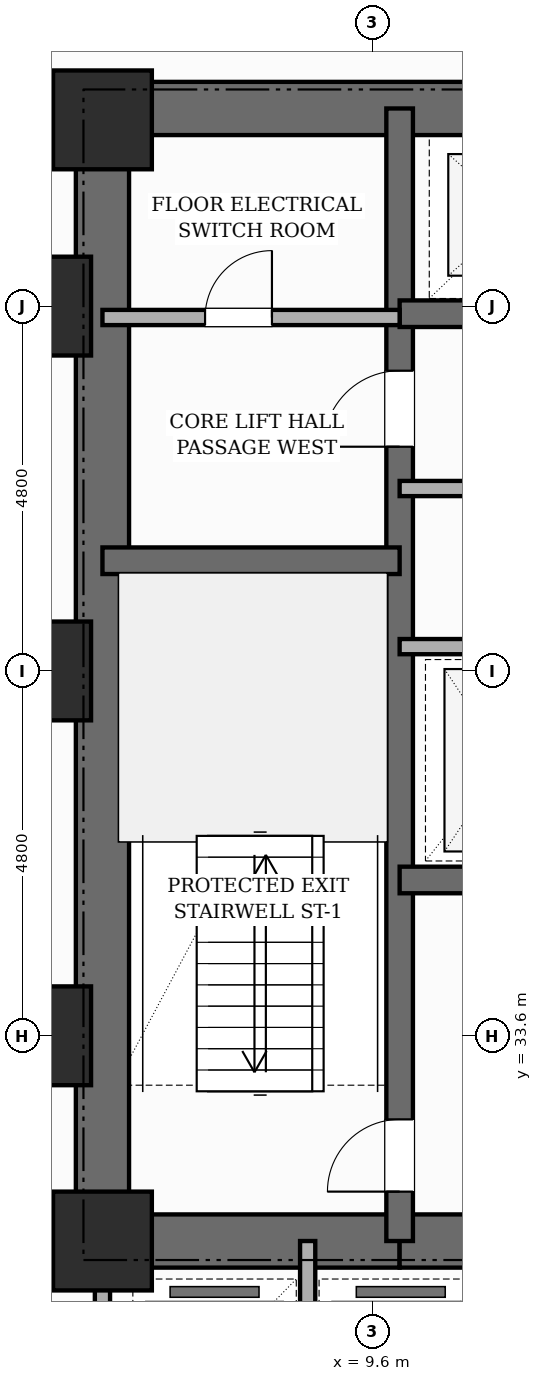
"""IFC4 building model, lengths in metres.
Left out: names, types, materials, properties, quantities, classifications, styles, units other than length and angle.
Written with IfcOpenShell. Run it as: python <this file> out.ifc"""

import sys

from ifc_helpers import new_model, si_unit, direction, frame, frame_2d, origin, origin_2d, place, context, subcontext, project, spatial, rectangle, extrude, element, fill, save


model = new_model("IFC4")
c1 = context("Model", 3, precision=1e-05, world=origin(), true_north=direction((0.0, 1.0)))
c2 = subcontext(c1, "Body", "Model", "MODEL_VIEW")
j1 = project(units=[si_unit("LENGTHUNIT", "METRE"), si_unit("PLANEANGLEUNIT", "RADIAN")], contexts=[c1])
p1 = place(None, origin())
s1 = spatial("IfcSite", under=j1, at=p1, CompositionType="ELEMENT")
p2 = place(p1, origin())
s2 = spatial("IfcBuilding", under=s1, at=p2, CompositionType="ELEMENT")
p3 = place(p2, frame((0.0, 0.0, -8.8)))
s3 = spatial("IfcBuildingStorey", under=s2, at=p3, CompositionType="ELEMENT", Elevation=-8.8)
p4 = place(p3, frame((6.05, 30.55, 0.0), z_axis=(0.0, 0.0, 1.0), x_axis=(0.0, 1.0, 0.0)))
e1 = element("IfcWall", 1, at=p4, inside=s3, PredefinedType="SHEAR", context=c2, shape_type="SweptSolid", body=[
    extrude(rectangle(XDim=15.6, YDim=0.7, at=frame_2d((7.8, 0.0))), origin(), (0.0, 0.0, 1.0), 4.4),
])
p5 = place(p3, frame((6.05, 45.8, 0.0), z_axis=(0.0, 0.0, 1.0), x_axis=(1.0, 0.0, 0.0)))
e2 = element("IfcWall", 2, at=p5, inside=s3, PredefinedType="SHEAR", context=c2, shape_type="SweptSolid", body=[
    extrude(rectangle(XDim=16.7, YDim=0.7, at=frame_2d((8.35, 0.0))), origin(), (0.0, 0.0, 1.0), 4.4),
])
p6 = place(p3, frame((6.05, 30.9, 0.0), z_axis=(0.0, 0.0, 1.0), x_axis=(1.0, 0.0, 0.0)))
e3 = element("IfcWall", 3, at=p6, inside=s3, PredefinedType="SHEAR", context=c2, shape_type="SweptSolid", body=[
    extrude(rectangle(XDim=3.91, YDim=0.7, at=frame_2d((1.955, 0.0))), origin(), (0.0, 0.0, 1.0), 4.4),
])
p7 = place(p3, frame((9.96, 30.9, 0.0), z_axis=(0.0, 0.0, 1.0), x_axis=(1.0, 0.0, 0.0)))
e4 = element("IfcWall", 4, at=p7, inside=s3, PredefinedType="SHEAR", context=c2, shape_type="SweptSolid", body=[
    extrude(rectangle(XDim=8.88, YDim=0.7, at=frame_2d((4.44, 0.0))), origin(), (0.0, 0.0, 1.0), 4.4),
])
p8 = place(p7, frame((4.09, 0.0, 0.0)))
e5 = element("IfcOpeningElement", 5, at=p8, cuts=e4, PredefinedType="OPENING", context=c2, shape_type="SweptSolid", body=[
    extrude(rectangle(XDim=1.0, YDim=2.15, at=frame_2d((0.5, 1.075))), frame((0.0, 0.36, 0.0), z_axis=(0.0, -1.0, 0.0), x_axis=(1.0, 0.0, 0.0)), (0.0, 0.0, 1.0), 0.72),
])
p9 = place(p3, frame((9.96, 30.9, 0.0), z_axis=(0.0, 0.0, 1.0), x_axis=(0.0, 1.0, 0.0)))
e6 = element("IfcWall", 6, at=p9, inside=s3, PredefinedType="SHEAR", context=c2, shape_type="SweptSolid", body=[
    extrude(rectangle(XDim=14.9, YDim=0.35, at=frame_2d((7.45, 0.0))), origin(), (0.0, 0.0, 1.0), 4.4),
])
p10 = place(p9, frame((0.65, 0.0, 0.0)))
e7 = element("IfcOpeningElement", 7, at=p10, cuts=e6, PredefinedType="OPENING", context=c2, shape_type="SweptSolid", body=[
    extrude(rectangle(XDim=0.95, YDim=2.1, at=frame_2d((0.475, 1.05))), frame((0.0, 0.185, 0.0), z_axis=(0.0, -1.0, 0.0), x_axis=(1.0, 0.0, 0.0)), (0.0, 0.0, 1.0), 0.37),
])
p11 = place(p9, frame((10.45, 0.0, 0.0)))
e8 = element("IfcOpeningElement", 8, at=p11, cuts=e6, PredefinedType="OPENING", context=c2, shape_type="SweptSolid", body=[
    extrude(rectangle(XDim=1.0, YDim=2.15, at=frame_2d((0.5, 1.075))), frame((0.0, 0.185, 0.0), z_axis=(0.0, -1.0, 0.0), x_axis=(1.0, 0.0, 0.0)), (0.0, 0.0, 1.0), 0.37),
])
p12 = place(p3, frame((6.05, 39.85, 0.0), z_axis=(0.0, 0.0, 1.0), x_axis=(1.0, 0.0, 0.0)))
e9 = element("IfcWall", 9, at=p12, inside=s3, PredefinedType="SHEAR", context=c2, shape_type="SweptSolid", body=[
    extrude(rectangle(XDim=3.91, YDim=0.35, at=frame_2d((1.955, 0.0))), origin(), (0.0, 0.0, 1.0), 4.4),
])
p13 = place(p3, frame((9.96, 35.65, 0.0), z_axis=(0.0, 0.0, 1.0), x_axis=(1.0, 0.0, 0.0)))
e10 = element("IfcWall", 10, at=p13, inside=s3, PredefinedType="SHEAR", context=c2, shape_type="SweptSolid", body=[
    extrude(rectangle(XDim=8.88, YDim=0.35, at=frame_2d((4.44, 0.0))), origin(), (0.0, 0.0, 1.0), 4.4),
])
p14 = place(p13, frame((0.84, 0.0, 0.0)))
e11 = element("IfcOpeningElement", 11, at=p14, cuts=e10, PredefinedType="OPENING", context=c2, shape_type="SweptSolid", body=[
    extrude(rectangle(XDim=1.1, YDim=2.15, at=frame_2d((0.55, 1.075))), frame((0.0, 0.185, 0.0), z_axis=(0.0, -1.0, 0.0), x_axis=(1.0, 0.0, 0.0)), (0.0, 0.0, 1.0), 0.37),
])
p15 = place(p13, frame((5.24, 0.0, 0.0)))
e12 = element("IfcOpeningElement", 12, at=p15, cuts=e10, PredefinedType="OPENING", context=c2, shape_type="SweptSolid", body=[
    extrude(rectangle(XDim=1.1, YDim=2.15, at=frame_2d((0.55, 1.075))), frame((0.0, 0.185, 0.0), z_axis=(0.0, -1.0, 0.0), x_axis=(1.0, 0.0, 0.0)), (0.0, 0.0, 1.0), 0.37),
])
p16 = place(p13, frame((7.5, 0.0, 0.0)))
e13 = element("IfcOpeningElement", 13, at=p16, cuts=e10, PredefinedType="OPENING", context=c2, shape_type="SweptSolid", body=[
    extrude(rectangle(XDim=0.88, YDim=2.1, at=frame_2d((0.44, 1.05))), frame((0.0, 0.185, 0.0), z_axis=(0.0, -1.0, 0.0), x_axis=(1.0, 0.0, 0.0)), (0.0, 0.0, 1.0), 0.37),
])
p17 = place(p3, frame((9.96, 43.1, 0.0), z_axis=(0.0, 0.0, 1.0), x_axis=(1.0, 0.0, 0.0)))
e14 = element("IfcWall", 14, at=p17, inside=s3, PredefinedType="SHEAR", context=c2, shape_type="SweptSolid", body=[
    extrude(rectangle(XDim=8.88, YDim=0.35, at=frame_2d((4.44, 0.0))), origin(), (0.0, 0.0, 1.0), 4.4),
])
p18 = place(p17, frame((0.99, 0.0, 0.0)))
e15 = element("IfcOpeningElement", 15, at=p18, cuts=e14, PredefinedType="OPENING", context=c2, shape_type="SweptSolid", body=[
    extrude(rectangle(XDim=1.1, YDim=2.15, at=frame_2d((0.55, 1.075))), frame((0.0, 0.185, 0.0), z_axis=(0.0, -1.0, 0.0), x_axis=(1.0, 0.0, 0.0)), (0.0, 0.0, 1.0), 0.37),
])
p19 = place(p17, frame((3.89, 0.0, 0.0)))
e16 = element("IfcOpeningElement", 16, at=p19, cuts=e14, PredefinedType="OPENING", context=c2, shape_type="SweptSolid", body=[
    extrude(rectangle(XDim=1.1, YDim=2.15, at=frame_2d((0.55, 1.075))), frame((0.0, 0.185, 0.0), z_axis=(0.0, -1.0, 0.0), x_axis=(1.0, 0.0, 0.0)), (0.0, 0.0, 1.0), 0.37),
])
p20 = place(p17, frame((6.79, 0.0, 0.0)))
e17 = element("IfcOpeningElement", 17, at=p20, cuts=e14, PredefinedType="OPENING", context=c2, shape_type="SweptSolid", body=[
    extrude(rectangle(XDim=1.1, YDim=2.15, at=frame_2d((0.55, 1.075))), frame((0.0, 0.185, 0.0), z_axis=(0.0, -1.0, 0.0), x_axis=(1.0, 0.0, 0.0)), (0.0, 0.0, 1.0), 0.37),
])
for number, where, z_axis, x_axis in (
    (18, (5.25, 33.6, 0.0), (0.0, 0.0, 1.0), (1.0, 0.0, 0.0)),
    (19, (5.25, 38.4, 0.0), (0.0, 0.0, 1.0), (1.0, 0.0, 0.0)),
    (20, (5.25, 43.2, 0.0), (0.0, 0.0, 1.0), (1.0, 0.0, 0.0)),
    (21, (6.05, 30.9, 0.0), (0.0, 0.0, 1.0), (1.0, 0.0, 0.0)),
    (22, (6.05, 45.65, 0.0), (0.0, 0.0, 1.0), (1.0, 0.0, 0.0)),
):
    element("IfcColumn", number, at=place(p3, frame(where, z_axis=z_axis, x_axis=x_axis)), inside=s3, PredefinedType="COLUMN", context=c2, shape_type="SweptSolid", body=[
        extrude(rectangle(XDim=1.3, YDim=1.3, at=origin_2d()), origin(), (0.0, 0.0, 1.0), 4.4),
    ])
p21 = place(p3, frame((9.96, 38.72, 0.0), z_axis=(0.0, 0.0, 1.0), x_axis=(1.0, 0.0, 0.0)))
e23 = element("IfcWall", 23, at=p21, inside=s3, PredefinedType="POLYGONAL", context=c2, shape_type="SweptSolid", body=[
    extrude(rectangle(XDim=7.06, YDim=0.2, at=frame_2d((3.53, 0.0))), origin(), (0.0, 0.0, 1.0), 4.08),
])
p22 = place(p3, frame((9.96, 40.8, 0.0), z_axis=(0.0, 0.0, 1.0), x_axis=(1.0, 0.0, 0.0)))
e24 = element("IfcWall", 24, at=p22, inside=s3, PredefinedType="POLYGONAL", context=c2, shape_type="SweptSolid", body=[
    extrude(rectangle(XDim=8.88, YDim=0.2, at=frame_2d((4.44, 0.0))), origin(), (0.0, 0.0, 1.0), 4.08),
])
p23 = place(p22, frame((7.5, 0.0, 0.0)))
e25 = element("IfcOpeningElement", 25, at=p23, cuts=e24, PredefinedType="OPENING", context=c2, shape_type="SweptSolid", body=[
    extrude(rectangle(XDim=0.88, YDim=2.1, at=frame_2d((0.44, 1.05))), frame((0.0, 0.11, 0.0), z_axis=(0.0, -1.0, 0.0), x_axis=(1.0, 0.0, 0.0)), (0.0, 0.0, 1.0), 0.22),
])
p24 = place(p22, frame((1.7, 0.0, 0.0)))
e26 = element("IfcOpeningElement", 26, at=p24, cuts=e24, PredefinedType="OPENING", context=c2, shape_type="SweptSolid", body=[
    extrude(rectangle(XDim=0.88, YDim=2.1, at=frame_2d((0.44, 1.05))), frame((0.0, 0.11, 0.0), z_axis=(0.0, -1.0, 0.0), x_axis=(1.0, 0.0, 0.0)), (0.0, 0.0, 1.0), 0.22),
])
p25 = place(p22, frame((4.9, 0.0, 0.0)))
e27 = element("IfcOpeningElement", 27, at=p25, cuts=e24, PredefinedType="OPENING", context=c2, shape_type="SweptSolid", body=[
    extrude(rectangle(XDim=0.88, YDim=2.1, at=frame_2d((0.44, 1.05))), frame((0.0, 0.11, 0.0), z_axis=(0.0, -1.0, 0.0), x_axis=(1.0, 0.0, 0.0)), (0.0, 0.0, 1.0), 0.22),
])
p26 = place(p3, frame((6.05, 43.05, 0.0), z_axis=(0.0, 0.0, 1.0), x_axis=(1.0, 0.0, 0.0)))
e28 = element("IfcWall", 28, at=p26, inside=s3, PredefinedType="POLYGONAL", context=c2, shape_type="SweptSolid", body=[
    extrude(rectangle(XDim=3.91, YDim=0.2, at=frame_2d((1.955, 0.0))), origin(), (0.0, 0.0, 1.0), 3.28),
])
p27 = place(p26, frame((1.35, 0.0, 0.0)))
e29 = element("IfcOpeningElement", 29, at=p27, cuts=e28, PredefinedType="OPENING", context=c2, shape_type="SweptSolid", body=[
    extrude(rectangle(XDim=0.88, YDim=2.1, at=frame_2d((0.44, 1.05))), frame((0.0, 0.11, 0.0), z_axis=(0.0, -1.0, 0.0), x_axis=(1.0, 0.0, 0.0)), (0.0, 0.0, 1.0), 0.22),
])
p28 = place(p3, frame((6.05, 27.9, 0.0), z_axis=(0.0, 0.0, 1.0), x_axis=(0.0, 1.0, 0.0)))
e30 = element("IfcWall", 30, at=p28, inside=s3, PredefinedType="POLYGONAL", context=c2, shape_type="SweptSolid", body=[
    extrude(rectangle(XDim=3.0, YDim=0.2, at=frame_2d((1.5, 0.0))), origin(), (0.0, 0.0, 1.0), 4.08),
])
p29 = place(p3, frame((8.75, 28.0, 0.0), z_axis=(0.0, 0.0, 1.0), x_axis=(0.0, 1.0, 0.0)))
e31 = element("IfcWall", 31, at=p29, inside=s3, PredefinedType="POLYGONAL", context=c2, shape_type="SweptSolid", body=[
    extrude(rectangle(XDim=2.9, YDim=0.2, at=frame_2d((1.45, 0.0))), origin(), (0.0, 0.0, 1.0), 4.08),
])
p30 = place(p10, origin())
e32 = element("IfcDoor", 32, at=p30, inside=s3, OperationType="SINGLE_SWING_LEFT", PredefinedType="DOOR", context=c2, shape_type="SweptSolid", body=[
    extrude(rectangle(XDim=0.95, YDim=2.1, at=frame_2d((0.475, 1.05))), frame((0.0, 0.025, 0.0), z_axis=(0.0, -1.0, 0.0), x_axis=(1.0, 0.0, 0.0)), (0.0, 0.0, 1.0), 0.05),
])
fill(e7, e32)
p31 = place(p11, origin())
e33 = element("IfcDoor", 33, at=p31, inside=s3, OperationType="SINGLE_SWING_LEFT", PredefinedType="DOOR", context=c2, shape_type="SweptSolid", body=[
    extrude(rectangle(XDim=1.0, YDim=2.15, at=frame_2d((0.5, 1.075))), frame((0.0, 0.025, 0.0), z_axis=(0.0, -1.0, 0.0), x_axis=(1.0, 0.0, 0.0)), (0.0, 0.0, 1.0), 0.05),
])
fill(e8, e33)
p32 = place(p27, origin())
e34 = element("IfcDoor", 34, at=p32, inside=s3, OperationType="SINGLE_SWING_RIGHT", PredefinedType="DOOR", context=c2, shape_type="SweptSolid", body=[
    extrude(rectangle(XDim=0.88, YDim=2.1, at=frame_2d((0.44, 1.05))), frame((0.0, 0.025, 0.0), z_axis=(0.0, -1.0, 0.0), x_axis=(1.0, 0.0, 0.0)), (0.0, 0.0, 1.0), 0.05),
])
fill(e29, e34)
save(model, sys.argv[1])
